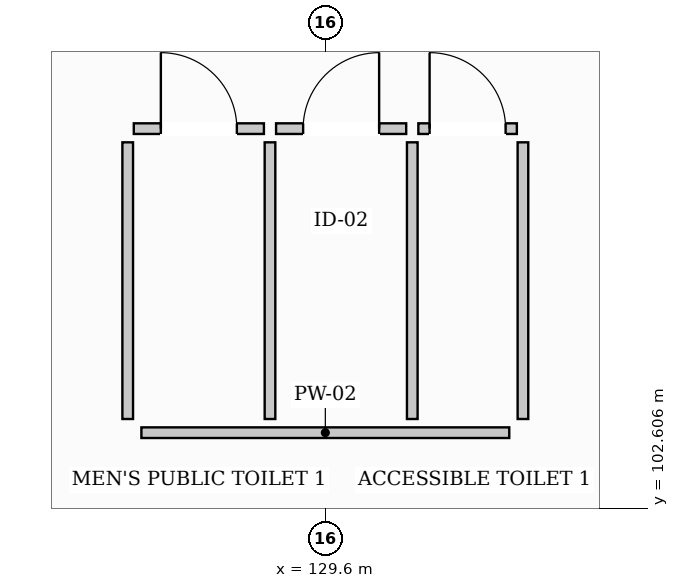
"""IFC4 building model, lengths in metres.
Left out: names, types, materials, properties, quantities, classifications, styles, units other than length and angle.
Written with IfcOpenShell. Run it as: python <this file> out.ifc"""

import sys

from ifc_helpers import new_model, si_unit, direction, frame, frame_2d, origin, place, context, subcontext, project, spatial, rectangle, extrude, element, fill, save


model = new_model("IFC4")
c1 = context("Model", 3, precision=1e-05, world=origin(), true_north=direction((0.0, 1.0)))
c2 = subcontext(c1, "Body", "Model", "MODEL_VIEW")
j1 = project(units=[si_unit("LENGTHUNIT", "METRE"), si_unit("PLANEANGLEUNIT", "RADIAN")], contexts=[c1])
p1 = place(None, origin())
s1 = spatial("IfcSite", under=j1, at=p1, CompositionType="ELEMENT")
p2 = place(p1, origin())
s2 = spatial("IfcBuilding", under=s1, at=p2, CompositionType="ELEMENT")
p3 = place(p2, frame((0.0, 0.0, 20.4)))
s3 = spatial("IfcBuildingStorey", under=s2, at=p3, CompositionType="ELEMENT", Elevation=20.4)
p4 = place(p3, frame((127.18, 103.6, 0.0), z_axis=(0.0, 0.0, 1.0), x_axis=(1.0, 0.0, 0.0)))
e1 = element("IfcWall", 1, at=p4, inside=s3, PredefinedType="PARTITIONING", context=c2, shape_type="SweptSolid", body=[
    extrude(rectangle(XDim=4.84, YDim=0.14, at=frame_2d((2.42, 0.0))), origin(), (0.0, 0.0, 1.0), 2.69),
])
for number, where, z_axis, x_axis in (
    (2, (127.0, 103.78, 0.0), (0.0, 0.0, 1.0), (0.0, 1.0, 0.0)),
    (3, (132.2, 103.78, 0.0), (0.0, 0.0, 1.0), (0.0, 1.0, 0.0)),
    (4, (128.872, 103.78, 0.0), (0.0, 0.0, 1.0), (0.0, 1.0, 0.0)),
    (5, (130.744, 103.78, 0.0), (0.0, 0.0, 1.0), (0.0, 1.0, 0.0)),
):
    element("IfcWall", number, at=place(p3, frame(where, z_axis=z_axis, x_axis=x_axis)), inside=s3, PredefinedType="PARTITIONING", context=c2, shape_type="SweptSolid", body=[
        extrude(rectangle(XDim=3.64, YDim=0.14, at=frame_2d((1.82, 0.0))), origin(), (0.0, 0.0, 1.0), 3.34),
    ])
p5 = place(p3, frame((127.08, 107.6, 0.0), z_axis=(0.0, 0.0, 1.0), x_axis=(1.0, 0.0, 0.0)))
e6 = element("IfcWall", 6, at=p5, inside=s3, PredefinedType="PARTITIONING", context=c2, shape_type="SweptSolid", body=[
    extrude(rectangle(XDim=1.712, YDim=0.14, at=frame_2d((0.856, 0.0))), origin(), (0.0, 0.0, 1.0), 3.34),
])
p6 = place(p5, frame((0.356, 0.0, 0.0)))
e7 = element("IfcOpeningElement", 7, at=p6, cuts=e6, PredefinedType="OPENING", context=c2, shape_type="SweptSolid", body=[
    extrude(rectangle(XDim=1.0, YDim=2.15, at=frame_2d((0.5, 1.075))), frame((0.0, 0.08, 0.0), z_axis=(0.0, -1.0, 0.0), x_axis=(1.0, 0.0, 0.0)), (0.0, 0.0, 1.0), 0.16),
])
p7 = place(p3, frame((128.952, 107.6, 0.0), z_axis=(0.0, 0.0, 1.0), x_axis=(1.0, 0.0, 0.0)))
e8 = element("IfcWall", 8, at=p7, inside=s3, PredefinedType="PARTITIONING", context=c2, shape_type="SweptSolid", body=[
    extrude(rectangle(XDim=1.712, YDim=0.14, at=frame_2d((0.856, 0.0))), origin(), (0.0, 0.0, 1.0), 2.69),
])
p8 = place(p7, frame((0.356, 0.0, 0.0)))
e9 = element("IfcOpeningElement", 9, at=p8, cuts=e8, PredefinedType="OPENING", context=c2, shape_type="SweptSolid", body=[
    extrude(rectangle(XDim=1.0, YDim=2.15, at=frame_2d((0.5, 1.075))), frame((0.0, 0.08, 0.0), z_axis=(0.0, -1.0, 0.0), x_axis=(1.0, 0.0, 0.0)), (0.0, 0.0, 1.0), 0.16),
])
p9 = place(p3, frame((130.824, 107.6, 0.0), z_axis=(0.0, 0.0, 1.0), x_axis=(1.0, 0.0, 0.0)))
e10 = element("IfcWall", 10, at=p9, inside=s3, PredefinedType="PARTITIONING", context=c2, shape_type="SweptSolid", body=[
    extrude(rectangle(XDim=1.296, YDim=0.14, at=frame_2d((0.648, 0.0))), origin(), (0.0, 0.0, 1.0), 3.34),
])
p10 = place(p9, frame((0.148, 0.0, 0.0)))
e11 = element("IfcOpeningElement", 11, at=p10, cuts=e10, PredefinedType="OPENING", context=c2, shape_type="SweptSolid", body=[
    extrude(rectangle(XDim=1.0, YDim=2.15, at=frame_2d((0.5, 1.075))), frame((0.0, 0.08, 0.0), z_axis=(0.0, -1.0, 0.0), x_axis=(1.0, 0.0, 0.0)), (0.0, 0.0, 1.0), 0.16),
])
p11 = place(p6, origin())
e12 = element("IfcDoor", 12, at=p11, inside=s3, OperationType="SINGLE_SWING_LEFT", PredefinedType="DOOR", context=c2, shape_type="SweptSolid", body=[
    extrude(rectangle(XDim=1.0, YDim=2.15, at=frame_2d((0.5, 1.075))), frame((0.0, 0.025, 0.0), z_axis=(0.0, -1.0, 0.0), x_axis=(1.0, 0.0, 0.0)), (0.0, 0.0, 1.0), 0.05),
])
fill(e7, e12)
p12 = place(p8, origin())
e13 = element("IfcDoor", 13, at=p12, inside=s3, OperationType="SINGLE_SWING_RIGHT", PredefinedType="DOOR", context=c2, shape_type="SweptSolid", body=[
    extrude(rectangle(XDim=1.0, YDim=2.15, at=frame_2d((0.5, 1.075))), frame((0.0, 0.025, 0.0), z_axis=(0.0, -1.0, 0.0), x_axis=(1.0, 0.0, 0.0)), (0.0, 0.0, 1.0), 0.05),
])
fill(e9, e13)
p13 = place(p10, origin())
e14 = element("IfcDoor", 14, at=p13, inside=s3, OperationType="SINGLE_SWING_LEFT", PredefinedType="DOOR", context=c2, shape_type="SweptSolid", body=[
    extrude(rectangle(XDim=1.0, YDim=2.15, at=frame_2d((0.5, 1.075))), frame((0.0, 0.025, 0.0), z_axis=(0.0, -1.0, 0.0), x_axis=(1.0, 0.0, 0.0)), (0.0, 0.0, 1.0), 0.05),
])
fill(e11, e14)
save(model, sys.argv[1])
